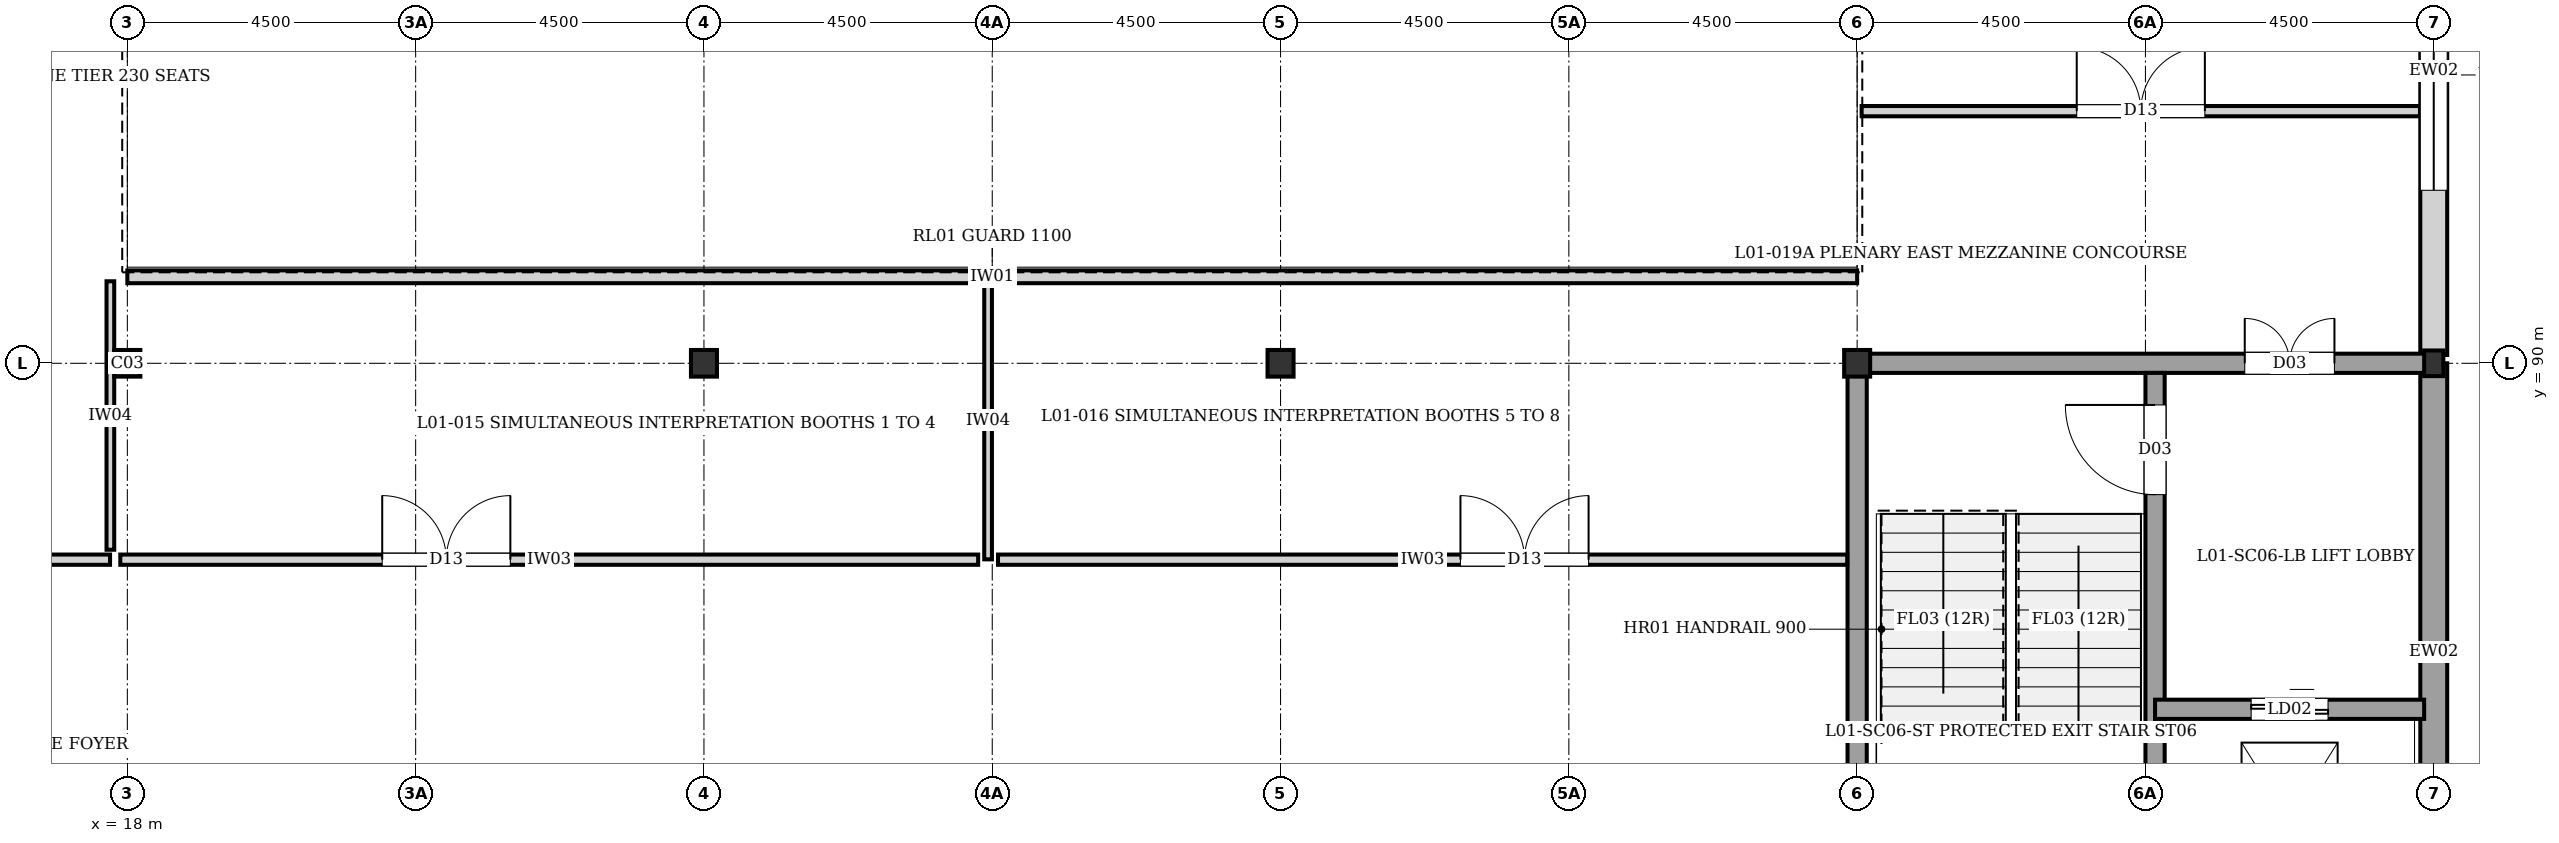
"""IFC4 building model, lengths in metres.
Left out: names, types, materials, properties, quantities, classifications, styles, units other than length and angle.
Written with IfcOpenShell. Run it as: python <this file> out.ifc"""

import sys

from ifc_helpers import new_model, si_unit, direction, frame, frame_2d, origin, origin_2d, place, context, subcontext, project, spatial, rectangle, i_section, extrude, element, fill, save


model = new_model("IFC4")
c1 = context("Model", 3, precision=1e-05, world=origin(), true_north=direction((0.0, 1.0)))
c2 = subcontext(c1, "Body", "Model", "MODEL_VIEW")
j1 = project(units=[si_unit("LENGTHUNIT", "METRE"), si_unit("PLANEANGLEUNIT", "RADIAN")], contexts=[c1])
p1 = place(None, origin())
s1 = spatial("IfcSite", under=j1, at=p1, CompositionType="ELEMENT")
p2 = place(p1, origin())
s2 = spatial("IfcBuilding", under=s1, at=p2, CompositionType="ELEMENT")
p3 = place(p2, frame((0.0, 0.0, 4.32)))
s3 = spatial("IfcBuildingStorey", under=s2, at=p3, CompositionType="ELEMENT", Elevation=4.32)
for number, where, z_axis, x_axis in (
    (1, (18.0, 90.0, 0.0), (0.0, 0.0, 1.0), (1.0, 0.0, 0.0)),
    (2, (27.0, 90.0, 0.0), (0.0, 0.0, 1.0), (1.0, 0.0, 0.0)),
    (3, (36.0, 90.0, 0.0), (0.0, 0.0, 1.0), (1.0, 0.0, 0.0)),
    (4, (45.0, 90.0, 0.0), (0.0, 0.0, 1.0), (1.0, 0.0, 0.0)),
):
    element("IfcColumn", number, at=place(p3, frame(where, z_axis=z_axis, x_axis=x_axis)), inside=s3, PredefinedType="COLUMN", context=c2, shape_type="SweptSolid", body=[
        extrude(i_section(OverallWidth=0.406, OverallDepth=0.416, WebThickness=0.022, FlangeThickness=0.038, at=origin_2d()), origin(), (0.0, 0.0, 1.0), 3.84),
    ])
p4 = place(p3, frame((54.0, 90.0, 0.0), z_axis=(0.0, 0.0, 1.0), x_axis=(1.0, 0.0, 0.0)))
e5 = element("IfcColumn", 5, at=p4, inside=s3, PredefinedType="COLUMN", context=c2, shape_type="SweptSolid", body=[
    extrude(i_section(OverallWidth=0.3, OverallDepth=0.4, WebThickness=0.013, FlangeThickness=0.024, at=origin_2d()), origin(), (0.0, 0.0, 1.0), 3.84),
])
p5 = place(p3, frame((54.0, 99.0, 0.0), z_axis=(0.0, 0.0, 1.0), x_axis=(0.0, -1.0, 0.0)))
e6 = element("IfcWall", 6, at=p5, inside=s3, PredefinedType="SOLIDWALL", context=c2, shape_type="SweptSolid", body=[
    extrude(rectangle(XDim=8.87, YDim=0.42, at=frame_2d((4.435, 0.0))), origin(), (0.0, 0.0, 1.0), 3.22),
])
p6 = place(p5, frame((2.7, 0.0, 0.4)))
e7 = element("IfcOpeningElement", 7, at=p6, cuts=e6, PredefinedType="OPENING", context=c2, shape_type="SweptSolid", body=[
    extrude(rectangle(XDim=3.6, YDim=2.2, at=frame_2d((1.8, 1.1))), frame((0.0, 0.22, 0.0), z_axis=(0.0, -1.0, 0.0), x_axis=(1.0, 0.0, 0.0)), (0.0, 0.0, 1.0), 0.44),
])
p7 = place(p3, frame((54.0, 90.0, 0.0), z_axis=(0.0, 0.0, 1.0), x_axis=(0.0, -1.0, 0.0)))
e8 = element("IfcWall", 8, at=p7, inside=s3, PredefinedType="SOLIDWALL", context=c2, shape_type="SweptSolid", body=[
    extrude(rectangle(XDim=9.0, YDim=0.42, at=frame_2d((4.5, 0.0))), origin(), (0.0, 0.0, 1.0), 3.6),
])
p8 = place(p3, frame((45.0, 90.0, 0.0), z_axis=(0.0, 0.0, 1.0), x_axis=(1.0, 0.0, 0.0)))
e9 = element("IfcWall", 9, at=p8, inside=s3, PredefinedType="SHEAR", context=c2, shape_type="SweptSolid", body=[
    extrude(rectangle(XDim=9.0, YDim=0.3, at=frame_2d((4.5, 0.0))), origin(), (0.0, 0.0, 1.0), 3.6),
])
p9 = place(p8, frame((6.05, 0.0, 0.0)))
e10 = element("IfcOpeningElement", 10, at=p9, cuts=e9, PredefinedType="OPENING", context=c2, shape_type="SweptSolid", body=[
    extrude(rectangle(XDim=1.4, YDim=2.02, at=frame_2d((0.7, 1.01))), frame((0.0, 0.16, 0.0), z_axis=(0.0, -1.0, 0.0), x_axis=(1.0, 0.0, 0.0)), (0.0, 0.0, 1.0), 0.32),
])
p10 = place(p3, frame((45.0, 81.0, 0.0), z_axis=(0.0, 0.0, 1.0), x_axis=(0.0, 1.0, 0.0)))
e11 = element("IfcWall", 11, at=p10, inside=s3, PredefinedType="SHEAR", context=c2, shape_type="SweptSolid", body=[
    extrude(rectangle(XDim=9.0, YDim=0.3, at=frame_2d((4.5, 0.0))), origin(), (0.0, 0.0, 1.0), 3.6),
])
p11 = place(p3, frame((49.65, 81.15, 0.0), z_axis=(0.0, 0.0, 1.0), x_axis=(0.0, 1.0, 0.0)))
e12 = element("IfcWall", 12, at=p11, inside=s3, PredefinedType="SHEAR", context=c2, shape_type="SweptSolid", body=[
    extrude(rectangle(XDim=8.7, YDim=0.3, at=frame_2d((4.35, 0.0))), origin(), (0.0, 0.0, 1.0), 3.6),
])
p12 = place(p11, frame((6.8, 0.0, 0.0)))
e13 = element("IfcOpeningElement", 13, at=p12, cuts=e12, PredefinedType="OPENING", context=c2, shape_type="SweptSolid", body=[
    extrude(rectangle(XDim=1.4, YDim=2.02, at=frame_2d((0.7, 1.01))), frame((0.0, 0.16, 0.0), z_axis=(0.0, -1.0, 0.0), x_axis=(1.0, 0.0, 0.0)), (0.0, 0.0, 1.0), 0.32),
])
p13 = place(p3, frame((49.65, 84.6, 0.0), z_axis=(0.0, 0.0, 1.0), x_axis=(1.0, 0.0, 0.0)))
e14 = element("IfcWall", 14, at=p13, inside=s3, PredefinedType="SHEAR", context=c2, shape_type="SweptSolid", body=[
    extrude(rectangle(XDim=4.2, YDim=0.3, at=frame_2d((2.1, 0.0))), origin(), (0.0, 0.0, 1.0), 3.6),
])
p14 = place(p13, frame((1.5, 0.0, 0.0)))
e15 = element("IfcOpeningElement", 15, at=p14, cuts=e14, PredefinedType="OPENING", context=c2, shape_type="SweptSolid", body=[
    extrude(rectangle(XDim=1.2, YDim=2.2, at=frame_2d((0.6, 1.1))), frame((0.0, 0.16, 0.0), z_axis=(0.0, -1.0, 0.0), x_axis=(1.0, 0.0, 0.0)), (0.0, 0.0, 1.0), 0.32),
])
p15 = place(p3, frame((11.94, 86.935, 0.0), z_axis=(0.0, 0.0, 1.0), x_axis=(1.0, 0.0, 0.0)))
e16 = element("IfcWall", 16, at=p15, inside=s3, PredefinedType="PARTITIONING", context=c2, shape_type="SweptSolid", body=[
    extrude(rectangle(XDim=5.79, YDim=0.16, at=frame_2d((2.895, 0.0))), origin(), (0.0, 0.0, 1.0), 3.6),
])
p16 = place(p3, frame((17.735, 87.09, 0.0), z_axis=(0.0, 0.0, 1.0), x_axis=(0.0, 1.0, 0.0)))
e17 = element("IfcWall", 17, at=p16, inside=s3, PredefinedType="PARTITIONING", context=c2, shape_type="SweptSolid", body=[
    extrude(rectangle(XDim=4.19, YDim=0.12, at=frame_2d((2.095, 0.0))), origin(), (0.0, 0.0, 1.0), 3.6),
])
p17 = place(p3, frame((31.435, 86.94, 0.0), z_axis=(0.0, 0.0, 1.0), x_axis=(0.0, 1.0, 0.0)))
e18 = element("IfcWall", 18, at=p17, inside=s3, PredefinedType="PARTITIONING", context=c2, shape_type="SweptSolid", body=[
    extrude(rectangle(XDim=4.34, YDim=0.12, at=frame_2d((2.17, 0.0))), origin(), (0.0, 0.0, 1.0), 3.6),
])
p18 = place(p3, frame((17.89, 86.935, 0.0), z_axis=(0.0, 0.0, 1.0), x_axis=(1.0, 0.0, 0.0)))
e19 = element("IfcWall", 19, at=p18, inside=s3, PredefinedType="PARTITIONING", context=c2, shape_type="SweptSolid", body=[
    extrude(rectangle(XDim=13.39, YDim=0.16, at=frame_2d((6.695, 0.0))), origin(), (0.0, 0.0, 1.0), 3.6),
])
p19 = place(p18, frame((4.088, 0.0, 0.0)))
e20 = element("IfcOpeningElement", 20, at=p19, cuts=e19, PredefinedType="OPENING", context=c2, shape_type="SweptSolid", body=[
    extrude(rectangle(XDim=2.0, YDim=2.35, at=frame_2d((1.0, 1.175))), frame((0.0, 0.09, 0.0), z_axis=(0.0, -1.0, 0.0), x_axis=(1.0, 0.0, 0.0)), (0.0, 0.0, 1.0), 0.18),
])
p20 = place(p3, frame((31.59, 86.935, 0.0), z_axis=(0.0, 0.0, 1.0), x_axis=(1.0, 0.0, 0.0)))
e21 = element("IfcWall", 21, at=p20, inside=s3, PredefinedType="PARTITIONING", context=c2, shape_type="SweptSolid", body=[
    extrude(rectangle(XDim=13.255, YDim=0.16, at=frame_2d((6.627, 0.0))), origin(), (0.0, 0.0, 1.0), 3.6),
])
p21 = place(p20, frame((7.218, 0.0, 0.0)))
e22 = element("IfcOpeningElement", 22, at=p21, cuts=e21, PredefinedType="OPENING", context=c2, shape_type="SweptSolid", body=[
    extrude(rectangle(XDim=2.0, YDim=2.35, at=frame_2d((1.0, 1.175))), frame((0.0, 0.09, 0.0), z_axis=(0.0, -1.0, 0.0), x_axis=(1.0, 0.0, 0.0)), (0.0, 0.0, 1.0), 0.18),
])
p22 = place(p3, frame((45.07, 93.935, 0.0), z_axis=(0.0, 0.0, 1.0), x_axis=(1.0, 0.0, 0.0)))
e23 = element("IfcWall", 23, at=p22, inside=s3, PredefinedType="PARTITIONING", context=c2, shape_type="SweptSolid", body=[
    extrude(rectangle(XDim=8.715, YDim=0.16, at=frame_2d((4.357, 0.0))), origin(), (0.0, 0.0, 1.0), 3.6),
])
p23 = place(p22, frame((3.357, 0.0, 0.0)))
e24 = element("IfcOpeningElement", 24, at=p23, cuts=e23, PredefinedType="OPENING", context=c2, shape_type="SweptSolid", body=[
    extrude(rectangle(XDim=2.0, YDim=2.35, at=frame_2d((1.0, 1.175))), frame((0.0, 0.09, 0.0), z_axis=(0.0, -1.0, 0.0), x_axis=(1.0, 0.0, 0.0)), (0.0, 0.0, 1.0), 0.18),
])
p24 = place(p3, frame((18.0, 91.35, 0.0), z_axis=(0.0, 0.0, 1.0), x_axis=(1.0, 0.0, 0.0)))
e25 = element("IfcWall", 25, at=p24, inside=s3, PredefinedType="PARTITIONING", context=c2, shape_type="SweptSolid", body=[
    extrude(rectangle(XDim=27.0, YDim=0.2, at=frame_2d((13.5, 0.0))), origin(), (0.0, 0.0, 1.0), 3.6),
])
p25 = place(p6, origin())
e26 = element("IfcWindow", 26, at=p25, inside=s3, PartitioningType="SINGLE_PANEL", PredefinedType="WINDOW", context=c2, shape_type="SweptSolid", body=[
    extrude(rectangle(XDim=3.6, YDim=2.2, at=frame_2d((1.8, 1.1))), frame((0.0, 0.03, 0.0), z_axis=(0.0, -1.0, 0.0), x_axis=(1.0, 0.0, 0.0)), (0.0, 0.0, 1.0), 0.06),
])
fill(e7, e26)
p26 = place(p9, origin())
e27 = element("IfcDoor", 27, at=p26, inside=s3, OperationType="DOUBLE_DOOR_SINGLE_SWING", PredefinedType="DOOR", context=c2, shape_type="SweptSolid", body=[
    extrude(rectangle(XDim=1.4, YDim=2.02, at=frame_2d((0.7, 1.01))), frame((0.0, 0.025, 0.0), z_axis=(0.0, -1.0, 0.0), x_axis=(1.0, 0.0, 0.0)), (0.0, 0.0, 1.0), 0.05),
])
fill(e10, e27)
p27 = place(p12, origin())
e28 = element("IfcDoor", 28, at=p27, inside=s3, OperationType="SINGLE_SWING_RIGHT", PredefinedType="DOOR", context=c2, shape_type="SweptSolid", body=[
    extrude(rectangle(XDim=1.4, YDim=2.02, at=frame_2d((0.7, 1.01))), frame((0.0, 0.025, 0.0), z_axis=(0.0, -1.0, 0.0), x_axis=(1.0, 0.0, 0.0)), (0.0, 0.0, 1.0), 0.05),
])
fill(e13, e28)
p28 = place(p14, origin())
e29 = element("IfcDoor", 29, at=p28, inside=s3, OperationType="DOUBLE_DOOR_SLIDING", PredefinedType="DOOR", context=c2, shape_type="SweptSolid", body=[
    extrude(rectangle(XDim=1.2, YDim=2.2, at=frame_2d((0.6, 1.1))), frame((0.0, 0.025, 0.0), z_axis=(0.0, -1.0, 0.0), x_axis=(1.0, 0.0, 0.0)), (0.0, 0.0, 1.0), 0.05),
])
fill(e15, e29)
p29 = place(p19, origin())
e30 = element("IfcDoor", 30, at=p29, inside=s3, OperationType="DOUBLE_DOOR_SINGLE_SWING", PredefinedType="DOOR", context=c2, shape_type="SweptSolid", body=[
    extrude(rectangle(XDim=2.0, YDim=2.35, at=frame_2d((1.0, 1.175))), frame((0.0, 0.025, 0.0), z_axis=(0.0, -1.0, 0.0), x_axis=(1.0, 0.0, 0.0)), (0.0, 0.0, 1.0), 0.05),
])
fill(e20, e30)
p30 = place(p21, origin())
e31 = element("IfcDoor", 31, at=p30, inside=s3, OperationType="DOUBLE_DOOR_SINGLE_SWING", PredefinedType="DOOR", context=c2, shape_type="SweptSolid", body=[
    extrude(rectangle(XDim=2.0, YDim=2.35, at=frame_2d((1.0, 1.175))), frame((0.0, 0.025, 0.0), z_axis=(0.0, -1.0, 0.0), x_axis=(1.0, 0.0, 0.0)), (0.0, 0.0, 1.0), 0.05),
])
fill(e22, e31)
p31 = place(p23, origin())
e32 = element("IfcDoor", 32, at=p31, inside=s3, OperationType="DOUBLE_DOOR_SINGLE_SWING", PredefinedType="DOOR", context=c2, shape_type="SweptSolid", body=[
    extrude(rectangle(XDim=2.0, YDim=2.35, at=frame_2d((1.0, 1.175))), frame((0.0, 0.025, 0.0), z_axis=(0.0, -1.0, 0.0), x_axis=(1.0, 0.0, 0.0)), (0.0, 0.0, 1.0), 0.05),
])
fill(e24, e32)
save(model, sys.argv[1])
